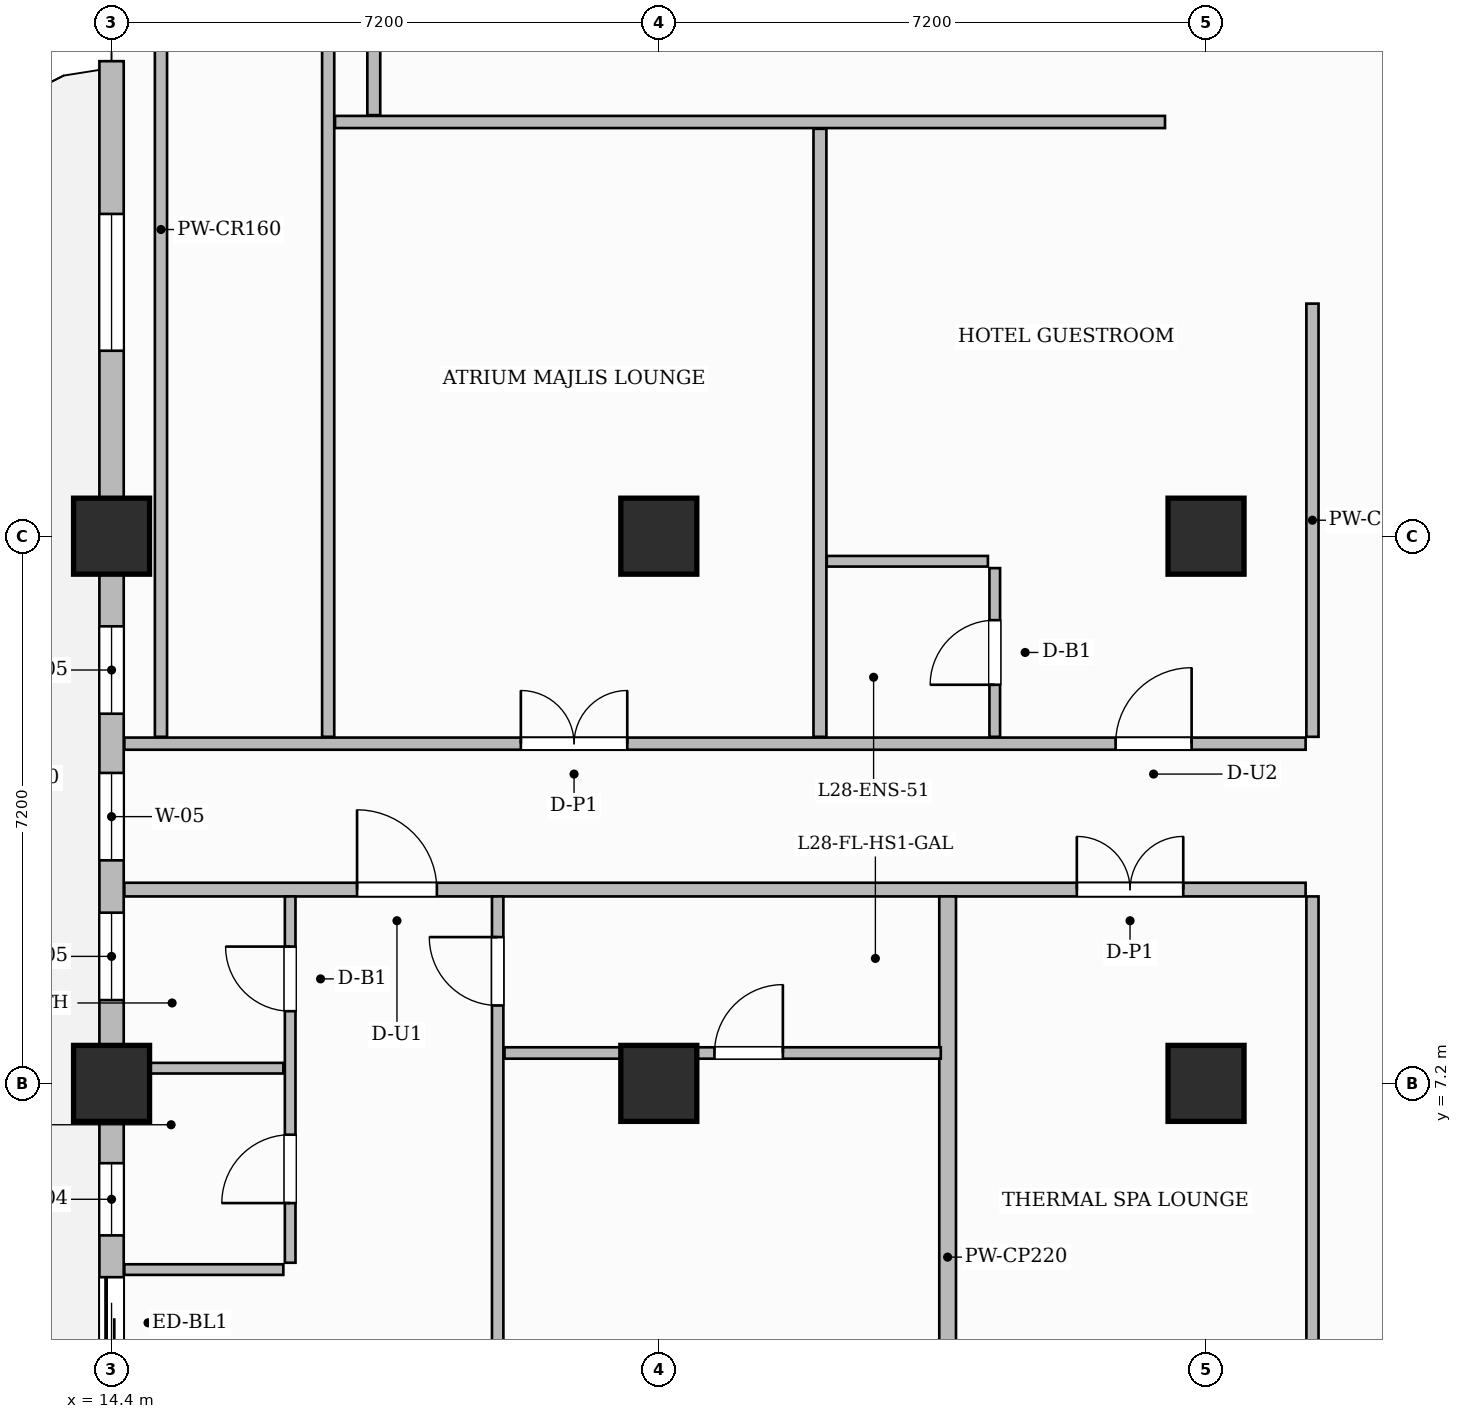
"""IFC4 building model, lengths in metres.
Left out: names, types, materials, properties, quantities, classifications, styles, units other than length and angle.
Written with IfcOpenShell. Run it as: python <this file> out.ifc"""

import sys

from ifc_helpers import new_model, si_unit, direction, frame, frame_2d, origin, origin_2d, place, context, subcontext, project, spatial, rectangle, extrude, source, transform, mapped, element, fill, save


model = new_model("IFC4")
c1 = context("Model", 3, precision=1e-05, world=origin(), true_north=direction((0.0, 1.0)))
c2 = subcontext(c1, "Body", "Model", "MODEL_VIEW")
j1 = project(units=[si_unit("LENGTHUNIT", "METRE"), si_unit("PLANEANGLEUNIT", "RADIAN")], contexts=[c1])
p1 = place(None, origin())
s1 = spatial("IfcSite", under=j1, at=p1, CompositionType="ELEMENT")
p2 = place(p1, origin())
s2 = spatial("IfcBuilding", under=s1, at=p2, CompositionType="ELEMENT")
p3 = place(p2, frame((0.0, 0.0, 115.5)))
s3 = spatial("IfcBuildingStorey", under=s2, at=p3, CompositionType="ELEMENT", Elevation=115.5)
m1 = source(origin(), c2, "Body", "SweptSolid", [
    extrude(rectangle(XDim=1.0, YDim=1.0, at=origin_2d()), origin(), (0.0, 0.0, 1.0), 3.7),
])
for number, where, z_axis, x_axis in (
    (1, (14.4, 7.2, 0.0), (0.0, 0.0, 1.0), (1.0, 0.0, 0.0)),
    (2, (14.4, 14.4, 0.0), (0.0, 0.0, 1.0), (1.0, 0.0, 0.0)),
    (3, (21.6, 7.2, 0.0), (0.0, 0.0, 1.0), (1.0, 0.0, 0.0)),
    (4, (21.6, 14.4, 0.0), (0.0, 0.0, 1.0), (1.0, 0.0, 0.0)),
    (5, (28.8, 7.2, 0.0), (0.0, 0.0, 1.0), (1.0, 0.0, 0.0)),
    (6, (28.8, 14.4, 0.0), (0.0, 0.0, 1.0), (1.0, 0.0, 0.0)),
):
    element("IfcColumn", number, at=place(p3, frame(where, z_axis=z_axis, x_axis=x_axis)), inside=s3, PredefinedType="COLUMN", context=c2, shape_type="MappedRepresentation", body=[
        mapped(m1, transform((0.0, 0.0, 0.0), scale=1.0)),
    ])
p4 = place(p3, frame((14.568, 9.75, 0.0), z_axis=(0.0, 0.0, 1.0), x_axis=(1.0, 0.0, 0.0)))
e7 = element("IfcWall", 7, at=p4, inside=s3, PredefinedType="PARTITIONING", context=c2, shape_type="SweptSolid", body=[
    extrude(rectangle(XDim=15.542, YDim=0.18, at=frame_2d((7.771, 0.0))), origin(), (0.0, 0.0, 1.0), 3.45),
])
p5 = place(p4, frame((3.062, 0.0, 0.0)))
e8 = element("IfcOpeningElement", 8, at=p5, cuts=e7, PredefinedType="OPENING", context=c2, shape_type="SweptSolid", body=[
    extrude(rectangle(XDim=1.05, YDim=2.25, at=frame_2d((0.525, 1.125))), frame((0.0, 0.1, 0.0), z_axis=(0.0, -1.0, 0.0), x_axis=(1.0, 0.0, 0.0)), (0.0, 0.0, 1.0), 0.2),
])
p6 = place(p4, frame((12.532, 0.0, 0.0)))
e9 = element("IfcOpeningElement", 9, at=p6, cuts=e7, PredefinedType="OPENING", context=c2, shape_type="SweptSolid", body=[
    extrude(rectangle(XDim=1.4, YDim=2.35, at=frame_2d((0.7, 1.175))), frame((0.0, 0.1, 0.0), z_axis=(0.0, -1.0, 0.0), x_axis=(1.0, 0.0, 0.0)), (0.0, 0.0, 1.0), 0.2),
])
p7 = place(p3, frame((14.568, 11.67, 0.0), z_axis=(0.0, 0.0, 1.0), x_axis=(1.0, 0.0, 0.0)))
e10 = element("IfcWall", 10, at=p7, inside=s3, PredefinedType="PARTITIONING", context=c2, shape_type="SweptSolid", body=[
    extrude(rectangle(XDim=15.542, YDim=0.16, at=frame_2d((7.771, 0.0))), origin(), (0.0, 0.0, 1.0), 3.45),
])
p8 = place(p7, frame((5.217, 0.0, 0.0)))
e11 = element("IfcOpeningElement", 11, at=p8, cuts=e10, PredefinedType="OPENING", context=c2, shape_type="SweptSolid", body=[
    extrude(rectangle(XDim=1.4, YDim=2.35, at=frame_2d((0.7, 1.175))), frame((0.0, 0.09, 0.0), z_axis=(0.0, -1.0, 0.0), x_axis=(1.0, 0.0, 0.0)), (0.0, 0.0, 1.0), 0.18),
])
p9 = place(p7, frame((13.042, 0.0, 0.0)))
e12 = element("IfcOpeningElement", 12, at=p9, cuts=e10, PredefinedType="OPENING", context=c2, shape_type="SweptSolid", body=[
    extrude(rectangle(XDim=1.0, YDim=2.2, at=frame_2d((0.5, 1.1))), frame((0.0, 0.09, 0.0), z_axis=(0.0, -1.0, 0.0), x_axis=(1.0, 0.0, 0.0)), (0.0, 0.0, 1.0), 0.18),
])
p10 = place(p3, frame((30.2, 11.76, 0.0), z_axis=(0.0, 0.0, 1.0), x_axis=(0.0, 1.0, 0.0)))
e13 = element("IfcWall", 13, at=p10, inside=s3, PredefinedType="PARTITIONING", context=c2, shape_type="SweptSolid", body=[
    extrude(rectangle(XDim=5.7, YDim=0.16, at=frame_2d((2.85, 0.0))), origin(), (0.0, 0.0, 1.0), 3.45),
])
p11 = place(p3, frame((30.2, 0.168, 0.0), z_axis=(0.0, 0.0, 1.0), x_axis=(0.0, 1.0, 0.0)))
e14 = element("IfcWall", 14, at=p11, inside=s3, PredefinedType="PARTITIONING", context=c2, shape_type="SweptSolid", body=[
    extrude(rectangle(XDim=9.492, YDim=0.16, at=frame_2d((4.746, 0.0))), origin(), (0.0, 0.0, 1.0), 3.45),
])
p12 = place(p11, frame((1.957, 0.0, 0.0)))
e15 = element("IfcOpeningElement", 15, at=p12, cuts=e14, PredefinedType="OPENING", context=c2, shape_type="SweptSolid", body=[
    extrude(rectangle(XDim=1.05, YDim=2.15, at=frame_2d((0.525, 1.075))), frame((0.0, 0.09, 0.0), z_axis=(0.0, -1.0, 0.0), x_axis=(1.0, 0.0, 0.0)), (0.0, 0.0, 1.0), 0.18),
])
p13 = place(p3, frame((25.4, 0.168, 0.0), z_axis=(0.0, 0.0, 1.0), x_axis=(0.0, 1.0, 0.0)))
e16 = element("IfcWall", 16, at=p13, inside=s3, PredefinedType="PARTITIONING", context=c2, shape_type="SweptSolid", body=[
    extrude(rectangle(XDim=9.492, YDim=0.22, at=frame_2d((4.746, 0.0))), origin(), (0.0, 0.0, 1.0), 3.105),
])
p14 = place(p3, frame((16.75, 4.84, 0.0), z_axis=(0.0, 0.0, 1.0), x_axis=(0.0, 1.0, 0.0)))
e17 = element("IfcWall", 17, at=p14, inside=s3, PredefinedType="PARTITIONING", context=c2, shape_type="SweptSolid", body=[
    extrude(rectangle(XDim=4.82, YDim=0.14, at=frame_2d((2.41, 0.0))), origin(), (0.0, 0.0, 1.0), 3.45),
])
p15 = place(p14, frame((0.785, 0.0, 0.0)))
e18 = element("IfcOpeningElement", 18, at=p15, cuts=e17, PredefinedType="OPENING", context=c2, shape_type="SweptSolid", body=[
    extrude(rectangle(XDim=0.9, YDim=2.15, at=frame_2d((0.45, 1.075))), frame((0.0, 0.08, 0.0), z_axis=(0.0, -1.0, 0.0), x_axis=(1.0, 0.0, 0.0)), (0.0, 0.0, 1.0), 0.16),
])
p16 = place(p14, frame((3.31, 0.0, 0.0)))
e19 = element("IfcOpeningElement", 19, at=p16, cuts=e17, PredefinedType="OPENING", context=c2, shape_type="SweptSolid", body=[
    extrude(rectangle(XDim=0.85, YDim=2.1, at=frame_2d((0.425, 1.05))), frame((0.0, 0.08, 0.0), z_axis=(0.0, -1.0, 0.0), x_axis=(1.0, 0.0, 0.0)), (0.0, 0.0, 1.0), 0.16),
])
p17 = place(p3, frame((14.59, 7.4, 0.0), z_axis=(0.0, 0.0, 1.0), x_axis=(1.0, 0.0, 0.0)))
e20 = element("IfcWall", 20, at=p17, inside=s3, PredefinedType="PARTITIONING", context=c2, shape_type="SweptSolid", body=[
    extrude(rectangle(XDim=2.07, YDim=0.14, at=frame_2d((1.035, 0.0))), origin(), (0.0, 0.0, 1.0), 2.935),
])
p18 = place(p3, frame((14.568, 4.75, 0.0), z_axis=(0.0, 0.0, 1.0), x_axis=(1.0, 0.0, 0.0)))
e21 = element("IfcWall", 21, at=p18, inside=s3, PredefinedType="PARTITIONING", context=c2, shape_type="SweptSolid", body=[
    extrude(rectangle(XDim=2.092, YDim=0.14, at=frame_2d((1.046, 0.0))), origin(), (0.0, 0.0, 1.0), 3.45),
])
p19 = place(p3, frame((19.48, 0.168, 0.0), z_axis=(0.0, 0.0, 1.0), x_axis=(0.0, 1.0, 0.0)))
e22 = element("IfcWall", 22, at=p19, inside=s3, PredefinedType="PARTITIONING", context=c2, shape_type="SweptSolid", body=[
    extrude(rectangle(XDim=9.492, YDim=0.15, at=frame_2d((4.746, 0.0))), origin(), (0.0, 0.0, 1.0), 3.45),
])
p20 = place(p19, frame((8.057, 0.0, 0.0)))
e23 = element("IfcOpeningElement", 23, at=p20, cuts=e22, PredefinedType="OPENING", context=c2, shape_type="SweptSolid", body=[
    extrude(rectangle(XDim=0.9, YDim=2.15, at=frame_2d((0.45, 1.075))), frame((0.0, 0.085, 0.0), z_axis=(0.0, -1.0, 0.0), x_axis=(1.0, 0.0, 0.0)), (0.0, 0.0, 1.0), 0.17),
])
p21 = place(p3, frame((19.57, 7.6, 0.0), z_axis=(0.0, 0.0, 1.0), x_axis=(1.0, 0.0, 0.0)))
e24 = element("IfcWall", 24, at=p21, inside=s3, PredefinedType="PARTITIONING", context=c2, shape_type="SweptSolid", body=[
    extrude(rectangle(XDim=5.74, YDim=0.15, at=frame_2d((2.87, 0.0))), origin(), (0.0, 0.0, 1.0), 3.45),
])
p22 = place(p21, frame((2.762, 0.0, 0.0)))
e25 = element("IfcOpeningElement", 25, at=p22, cuts=e24, PredefinedType="OPENING", context=c2, shape_type="SweptSolid", body=[
    extrude(rectangle(XDim=0.9, YDim=2.15, at=frame_2d((0.45, 1.075))), frame((0.0, 0.085, 0.0), z_axis=(0.0, -1.0, 0.0), x_axis=(1.0, 0.0, 0.0)), (0.0, 0.0, 1.0), 0.17),
])
for number, where, z_axis, x_axis in (
    (26, (15.05, 11.76, 0.0), (0.0, 0.0, 1.0), (0.0, 1.0, 0.0)),
    (27, (17.25, 11.76, 0.0), (0.0, 0.0, 1.0), (0.0, 1.0, 0.0)),
):
    element("IfcWall", number, at=place(p3, frame(where, z_axis=z_axis, x_axis=x_axis)), inside=s3, PredefinedType="PARTITIONING", context=c2, shape_type="SweptSolid", body=[
        extrude(rectangle(XDim=13.35, YDim=0.16, at=frame_2d((6.675, 0.0))), origin(), (0.0, 0.0, 1.0), 3.45),
    ])
p23 = place(p3, frame((17.85, 19.94, 0.0), z_axis=(0.0, 0.0, 1.0), x_axis=(0.0, 1.0, 0.0)))
e28 = element("IfcWall", 28, at=p23, inside=s3, PredefinedType="PARTITIONING", context=c2, shape_type="SweptSolid", body=[
    extrude(rectangle(XDim=5.22, YDim=0.17, at=frame_2d((2.61, 0.0))), origin(), (0.0, 0.0, 1.0), 3.105),
])
p24 = place(p3, frame((17.34, 19.85, 0.0), z_axis=(0.0, 0.0, 1.0), x_axis=(1.0, 0.0, 0.0)))
e29 = element("IfcWall", 29, at=p24, inside=s3, PredefinedType="PARTITIONING", context=c2, shape_type="SweptSolid", body=[
    extrude(rectangle(XDim=10.92, YDim=0.16, at=frame_2d((5.46, 0.0))), origin(), (0.0, 0.0, 1.0), 3.45),
])
p25 = place(p3, frame((23.72, 11.76, 0.0), z_axis=(0.0, 0.0, 1.0), x_axis=(0.0, 1.0, 0.0)))
e30 = element("IfcWall", 30, at=p25, inside=s3, PredefinedType="PARTITIONING", context=c2, shape_type="SweptSolid", body=[
    extrude(rectangle(XDim=8.0, YDim=0.17, at=frame_2d((4.0, 0.0))), origin(), (0.0, 0.0, 1.0), 3.45),
])
p26 = place(p3, frame((26.02, 11.76, 0.0), z_axis=(0.0, 0.0, 1.0), x_axis=(0.0, 1.0, 0.0)))
e31 = element("IfcWall", 31, at=p26, inside=s3, PredefinedType="PARTITIONING", context=c2, shape_type="SweptSolid", body=[
    extrude(rectangle(XDim=2.22, YDim=0.14, at=frame_2d((1.11, 0.0))), origin(), (0.0, 0.0, 1.0), 3.45),
])
p27 = place(p26, frame((0.685, 0.0, 0.0)))
e32 = element("IfcOpeningElement", 32, at=p27, cuts=e31, PredefinedType="OPENING", context=c2, shape_type="SweptSolid", body=[
    extrude(rectangle(XDim=0.85, YDim=2.1, at=frame_2d((0.425, 1.05))), frame((0.0, 0.08, 0.0), z_axis=(0.0, -1.0, 0.0), x_axis=(1.0, 0.0, 0.0)), (0.0, 0.0, 1.0), 0.16),
])
p28 = place(p3, frame((23.81, 14.07, 0.0), z_axis=(0.0, 0.0, 1.0), x_axis=(1.0, 0.0, 0.0)))
e33 = element("IfcWall", 33, at=p28, inside=s3, PredefinedType="PARTITIONING", context=c2, shape_type="SweptSolid", body=[
    extrude(rectangle(XDim=2.12, YDim=0.14, at=frame_2d((1.06, 0.0))), origin(), (0.0, 0.0, 1.0), 3.45),
])
p29 = place(p3, frame((14.4, 0.05, 0.0), z_axis=(0.0, 0.0, 1.0), x_axis=(0.0, 1.0, 0.0)))
e34 = element("IfcWall", 34, at=p29, inside=s3, PredefinedType="SOLIDWALL", context=c2, shape_type="SweptSolid", body=[
    extrude(rectangle(XDim=20.6, YDim=0.32, at=frame_2d((10.3, 0.0))), origin(), (0.0, 0.0, 1.0), 2.935),
])
p30 = place(p29, frame((3.4, 0.0, 0.0)))
e35 = element("IfcOpeningElement", 35, at=p30, cuts=e34, PredefinedType="OPENING", context=c2, shape_type="SweptSolid", body=[
    extrude(rectangle(XDim=1.2, YDim=2.2, at=frame_2d((0.6, 1.1))), frame((0.0, 0.17, 0.0), z_axis=(0.0, -1.0, 0.0), x_axis=(1.0, 0.0, 0.0)), (0.0, 0.0, 1.0), 0.34),
])
p31 = place(p29, frame((1.225, 0.0, 0.8)))
e36 = element("IfcOpeningElement", 36, at=p31, cuts=e34, PredefinedType="OPENING", context=c2, shape_type="SweptSolid", body=[
    extrude(rectangle(XDim=1.4, YDim=1.85, at=frame_2d((0.7, 0.925))), frame((0.0, 0.17, 0.0), z_axis=(0.0, -1.0, 0.0), x_axis=(1.0, 0.0, 0.0)), (0.0, 0.0, 1.0), 0.34),
])
p32 = place(p29, frame((5.15, 0.0, 0.8)))
e37 = element("IfcOpeningElement", 37, at=p32, cuts=e34, PredefinedType="OPENING", context=c2, shape_type="SweptSolid", body=[
    extrude(rectangle(XDim=0.95, YDim=1.75, at=frame_2d((0.475, 0.875))), frame((0.0, 0.17, 0.0), z_axis=(0.0, -1.0, 0.0), x_axis=(1.0, 0.0, 0.0)), (0.0, 0.0, 1.0), 0.34),
])
p33 = place(p29, frame((8.246, 0.0, 0.8)))
e38 = element("IfcOpeningElement", 38, at=p33, cuts=e34, PredefinedType="OPENING", context=c2, shape_type="SweptSolid", body=[
    extrude(rectangle(XDim=1.15, YDim=1.8, at=frame_2d((0.575, 0.9))), frame((0.0, 0.17, 0.0), z_axis=(0.0, -1.0, 0.0), x_axis=(1.0, 0.0, 0.0)), (0.0, 0.0, 1.0), 0.34),
])
p34 = place(p29, frame((10.085, 0.0, 0.8)))
e39 = element("IfcOpeningElement", 39, at=p34, cuts=e34, PredefinedType="OPENING", context=c2, shape_type="SweptSolid", body=[
    extrude(rectangle(XDim=1.15, YDim=1.8, at=frame_2d((0.575, 0.9))), frame((0.0, 0.17, 0.0), z_axis=(0.0, -1.0, 0.0), x_axis=(1.0, 0.0, 0.0)), (0.0, 0.0, 1.0), 0.34),
])
p35 = place(p29, frame((12.014, 0.0, 0.8)))
e40 = element("IfcOpeningElement", 40, at=p35, cuts=e34, PredefinedType="OPENING", context=c2, shape_type="SweptSolid", body=[
    extrude(rectangle(XDim=1.15, YDim=1.8, at=frame_2d((0.575, 0.9))), frame((0.0, 0.17, 0.0), z_axis=(0.0, -1.0, 0.0), x_axis=(1.0, 0.0, 0.0)), (0.0, 0.0, 1.0), 0.34),
])
p36 = place(p29, frame((16.79, 0.0, 0.8)))
e41 = element("IfcOpeningElement", 41, at=p36, cuts=e34, PredefinedType="OPENING", context=c2, shape_type="SweptSolid", body=[
    extrude(rectangle(XDim=1.8, YDim=1.85, at=frame_2d((0.9, 0.925))), frame((0.0, 0.17, 0.0), z_axis=(0.0, -1.0, 0.0), x_axis=(1.0, 0.0, 0.0)), (0.0, 0.0, 1.0), 0.34),
])
m2 = source(origin(), c2, "Body", "SweptSolid", [
    extrude(rectangle(XDim=0.9, YDim=2.15, at=frame_2d((0.45, 1.075))), frame((0.0, 0.025, 0.0), z_axis=(0.0, -1.0, 0.0), x_axis=(1.0, 0.0, 0.0)), (0.0, 0.0, 1.0), 0.05),
])
p37 = place(p15, origin())
e42 = element("IfcDoor", 42, at=p37, inside=s3, OperationType="SINGLE_SWING_LEFT", PredefinedType="DOOR", context=c2, shape_type="MappedRepresentation", body=[
    mapped(m2, transform((0.0, 0.0, 0.0), scale=1.0)),
])
fill(e18, e42)
m3 = source(origin(), c2, "Body", "SweptSolid", [
    extrude(rectangle(XDim=0.85, YDim=2.1, at=frame_2d((0.425, 1.05))), frame((0.0, 0.025, 0.0), z_axis=(0.0, -1.0, 0.0), x_axis=(1.0, 0.0, 0.0)), (0.0, 0.0, 1.0), 0.05),
])
p38 = place(p16, origin())
e43 = element("IfcDoor", 43, at=p38, inside=s3, OperationType="SINGLE_SWING_RIGHT", PredefinedType="DOOR", context=c2, shape_type="MappedRepresentation", body=[
    mapped(m3, transform((0.0, 0.0, 0.0), scale=1.0)),
])
fill(e19, e43)
m4 = source(origin(), c2, "Body", "SweptSolid", [
    extrude(rectangle(XDim=1.05, YDim=2.25, at=frame_2d((0.525, 1.125))), frame((0.0, 0.025, 0.0), z_axis=(0.0, -1.0, 0.0), x_axis=(1.0, 0.0, 0.0)), (0.0, 0.0, 1.0), 0.05),
])
p39 = place(p5, origin())
e44 = element("IfcDoor", 44, at=p39, inside=s3, OperationType="SINGLE_SWING_LEFT", PredefinedType="DOOR", context=c2, shape_type="MappedRepresentation", body=[
    mapped(m4, transform((0.0, 0.0, 0.0), scale=1.0)),
])
fill(e8, e44)
p40 = place(p20, origin())
e45 = element("IfcDoor", 45, at=p40, inside=s3, OperationType="SINGLE_SWING_RIGHT", PredefinedType="DOOR", context=c2, shape_type="MappedRepresentation", body=[
    mapped(m2, transform((0.0, 0.0, 0.0), scale=1.0)),
])
fill(e23, e45)
p41 = place(p22, origin())
e46 = element("IfcDoor", 46, at=p41, inside=s3, OperationType="SINGLE_SWING_RIGHT", PredefinedType="DOOR", context=c2, shape_type="MappedRepresentation", body=[
    mapped(m2, transform((0.0, 0.0, 0.0), scale=1.0)),
])
fill(e25, e46)
m5 = source(origin(), c2, "Body", "SweptSolid", [
    extrude(rectangle(XDim=1.4, YDim=2.35, at=frame_2d((0.7, 1.175))), frame((0.0, 0.025, 0.0), z_axis=(0.0, -1.0, 0.0), x_axis=(1.0, 0.0, 0.0)), (0.0, 0.0, 1.0), 0.05),
])
p42 = place(p6, origin())
e47 = element("IfcDoor", 47, at=p42, inside=s3, OperationType="DOUBLE_DOOR_SINGLE_SWING", PredefinedType="DOOR", context=c2, shape_type="MappedRepresentation", body=[
    mapped(m5, transform((0.0, 0.0, 0.0), scale=1.0)),
])
fill(e9, e47)
p43 = place(p8, origin())
e48 = element("IfcDoor", 48, at=p43, inside=s3, OperationType="DOUBLE_DOOR_SINGLE_SWING", PredefinedType="DOOR", context=c2, shape_type="MappedRepresentation", body=[
    mapped(m5, transform((0.0, 0.0, 0.0), scale=1.0)),
])
fill(e11, e48)
p44 = place(p27, origin())
e49 = element("IfcDoor", 49, at=p44, inside=s3, OperationType="SINGLE_SWING_LEFT", PredefinedType="DOOR", context=c2, shape_type="MappedRepresentation", body=[
    mapped(m3, transform((0.0, 0.0, 0.0), scale=1.0)),
])
fill(e32, e49)
m6 = source(origin(), c2, "Body", "SweptSolid", [
    extrude(rectangle(XDim=1.0, YDim=2.2, at=frame_2d((0.5, 1.1))), frame((0.0, 0.025, 0.0), z_axis=(0.0, -1.0, 0.0), x_axis=(1.0, 0.0, 0.0)), (0.0, 0.0, 1.0), 0.05),
])
p45 = place(p9, origin())
e50 = element("IfcDoor", 50, at=p45, inside=s3, OperationType="SINGLE_SWING_RIGHT", PredefinedType="DOOR", context=c2, shape_type="MappedRepresentation", body=[
    mapped(m6, transform((0.0, 0.0, 0.0), scale=1.0)),
])
fill(e12, e50)
m7 = source(origin(), c2, "Body", "SweptSolid", [
    extrude(rectangle(XDim=1.2, YDim=2.2, at=frame_2d((0.6, 1.1))), frame((0.0, 0.025, 0.0), z_axis=(0.0, -1.0, 0.0), x_axis=(1.0, 0.0, 0.0)), (0.0, 0.0, 1.0), 0.05),
])
p46 = place(p30, origin())
e51 = element("IfcDoor", 51, at=p46, inside=s3, OperationType="SLIDING_TO_LEFT", PredefinedType="DOOR", context=c2, shape_type="MappedRepresentation", body=[
    mapped(m7, transform((0.0, 0.0, 0.0), scale=1.0)),
])
fill(e35, e51)
m8 = source(origin(), c2, "Body", "SweptSolid", [
    extrude(rectangle(XDim=0.95, YDim=1.75, at=frame_2d((0.475, 0.875))), frame((0.0, 0.03, 0.0), z_axis=(0.0, -1.0, 0.0), x_axis=(1.0, 0.0, 0.0)), (0.0, 0.0, 1.0), 0.06),
])
p47 = place(p32, origin())
e52 = element("IfcWindow", 52, at=p47, inside=s3, PartitioningType="SINGLE_PANEL", PredefinedType="WINDOW", context=c2, shape_type="MappedRepresentation", body=[
    mapped(m8, transform((0.0, 0.0, 0.0), scale=1.0)),
])
fill(e37, e52)
m9 = source(origin(), c2, "Body", "SweptSolid", [
    extrude(rectangle(XDim=1.15, YDim=1.8, at=frame_2d((0.575, 0.9))), frame((0.0, 0.03, 0.0), z_axis=(0.0, -1.0, 0.0), x_axis=(1.0, 0.0, 0.0)), (0.0, 0.0, 1.0), 0.06),
])
p48 = place(p33, origin())
e53 = element("IfcWindow", 53, at=p48, inside=s3, PartitioningType="SINGLE_PANEL", PredefinedType="WINDOW", context=c2, shape_type="MappedRepresentation", body=[
    mapped(m9, transform((0.0, 0.0, 0.0), scale=1.0)),
])
fill(e38, e53)
p49 = place(p34, origin())
e54 = element("IfcWindow", 54, at=p49, inside=s3, PartitioningType="SINGLE_PANEL", PredefinedType="WINDOW", context=c2, shape_type="MappedRepresentation", body=[
    mapped(m9, transform((0.0, 0.0, 0.0), scale=1.0)),
])
fill(e39, e54)
p50 = place(p35, origin())
e55 = element("IfcWindow", 55, at=p50, inside=s3, PartitioningType="SINGLE_PANEL", PredefinedType="WINDOW", context=c2, shape_type="MappedRepresentation", body=[
    mapped(m9, transform((0.0, 0.0, 0.0), scale=1.0)),
])
fill(e40, e55)
m10 = source(origin(), c2, "Body", "SweptSolid", [
    extrude(rectangle(XDim=1.8, YDim=1.85, at=frame_2d((0.9, 0.925))), frame((0.0, 0.03, 0.0), z_axis=(0.0, -1.0, 0.0), x_axis=(1.0, 0.0, 0.0)), (0.0, 0.0, 1.0), 0.06),
])
p51 = place(p36, origin())
e56 = element("IfcWindow", 56, at=p51, inside=s3, PartitioningType="DOUBLE_PANEL_VERTICAL", PredefinedType="WINDOW", context=c2, shape_type="MappedRepresentation", body=[
    mapped(m10, transform((0.0, 0.0, 0.0), scale=1.0)),
])
fill(e41, e56)
save(model, sys.argv[1])
